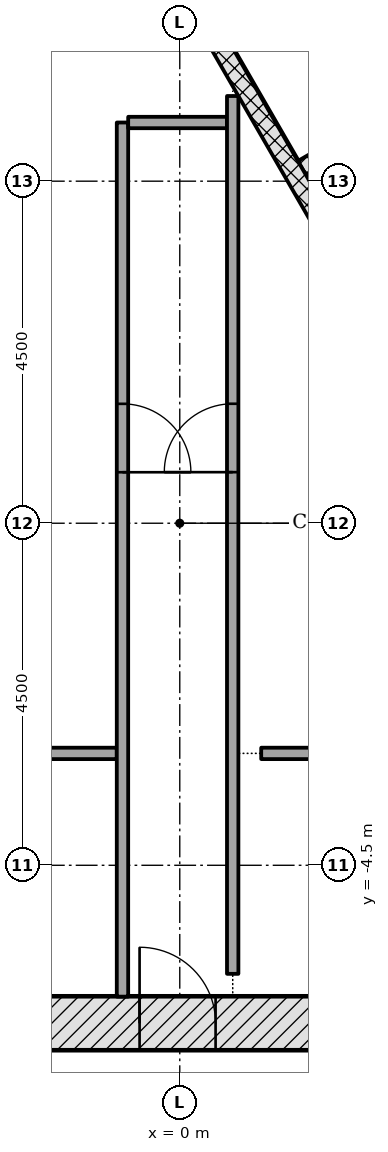
"""IFC4 building model, lengths in metres.
Left out: names, types, materials, properties, quantities, classifications, styles, units other than length and angle.
Written with IfcOpenShell. Run it as: python <this file> out.ifc"""

import sys

from ifc_helpers import new_model, si_unit, direction, frame, frame_2d, origin, place, context, subcontext, project, spatial, rectangle, extrude, element, fill, save


model = new_model("IFC4")
c1 = context("Model", 3, precision=1e-05, world=origin(), true_north=direction((0.0, 1.0)))
c2 = subcontext(c1, "Body", "Model", "MODEL_VIEW")
j1 = project(units=[si_unit("LENGTHUNIT", "METRE"), si_unit("PLANEANGLEUNIT", "RADIAN")], contexts=[c1])
p1 = place(None, origin())
s1 = spatial("IfcSite", under=j1, at=p1, CompositionType="ELEMENT")
p2 = place(p1, origin())
s2 = spatial("IfcBuilding", under=s1, at=p2, CompositionType="ELEMENT")
p3 = place(p2, frame((0.0, 0.0, 168.9)))
s3 = spatial("IfcBuildingStorey", under=s2, at=p3, CompositionType="ELEMENT", Elevation=168.9)
p4 = place(p3, frame((-9.229, -6.578, -0.3), z_axis=(0.0, 0.0, 1.0), x_axis=(1.0, 0.0, 0.0)))
e1 = element("IfcWall", 1, at=p4, inside=s3, PredefinedType="SHEAR", context=c2, shape_type="SweptSolid", body=[
    extrude(rectangle(XDim=18.458, YDim=0.7, at=frame_2d((9.229, 0.0))), origin(), (0.0, 0.0, 1.0), 5.5),
])
p5 = place(p4, frame((8.7, 0.0, 0.3)))
e2 = element("IfcOpeningElement", 2, at=p5, cuts=e1, PredefinedType="OPENING", context=c2, shape_type="SweptSolid", body=[
    extrude(rectangle(XDim=1.0, YDim=2.1, at=frame_2d((0.5, 1.05))), frame((0.0, 0.36, 0.0), z_axis=(0.0, -1.0, 0.0), x_axis=(1.0, 0.0, 0.0)), (0.0, 0.0, 1.0), 0.72),
])
p6 = place(p4, frame((3.99, 0.0, 0.3)))
e3 = element("IfcOpeningElement", 3, at=p6, cuts=e1, PredefinedType="OPENING", context=c2, shape_type="SweptSolid", body=[
    extrude(rectangle(XDim=0.9, YDim=2.1, at=frame_2d((0.45, 1.05))), frame((0.0, 0.36, 0.0), z_axis=(0.0, -1.0, 0.0), x_axis=(1.0, 0.0, 0.0)), (0.0, 0.0, 1.0), 0.72),
])
p7 = place(p4, frame((13.539, 0.0, 0.3)))
e4 = element("IfcOpeningElement", 4, at=p7, cuts=e1, PredefinedType="OPENING", context=c2, shape_type="SweptSolid", body=[
    extrude(rectangle(XDim=0.9, YDim=2.1, at=frame_2d((0.45, 1.05))), frame((0.0, 0.36, 0.0), z_axis=(0.0, -1.0, 0.0), x_axis=(1.0, 0.0, 0.0)), (0.0, 0.0, 1.0), 0.72),
])
p8 = place(p3, frame((10.311, -4.703, -0.3), z_axis=(0.0, 0.0, 1.0), x_axis=(-0.500001446645, 0.866024568562, 0.0)))
e5 = element("IfcWall", 5, at=p8, inside=s3, PredefinedType="SHEAR", context=c2, shape_type="SweptSolid", body=[
    extrude(rectangle(XDim=18.458, YDim=0.7, at=frame_2d((9.229, 0.0))), origin(), (0.0, 0.0, 1.0), 5.5),
])
p9 = place(p3, frame((-1.083, 11.281, -0.3), z_axis=(0.0, 0.0, 1.0), x_axis=(-0.500001446645, -0.866024568562, 0.0)))
e6 = element("IfcWall", 6, at=p9, inside=s3, PredefinedType="SHEAR", context=c2, shape_type="SweptSolid", body=[
    extrude(rectangle(XDim=18.458, YDim=0.7, at=frame_2d((9.229, 0.0))), origin(), (0.0, 0.0, 1.0), 5.5),
])
p10 = place(p9, frame((8.979, 0.0, 0.3)))
e7 = element("IfcOpeningElement", 7, at=p10, cuts=e6, PredefinedType="OPENING", context=c2, shape_type="SweptSolid", body=[
    extrude(rectangle(XDim=1.2, YDim=2.1, at=frame_2d((0.6, 1.05))), frame((0.0, 0.36, 0.0), z_axis=(0.0, -1.0, 0.0), x_axis=(1.0, 0.0, 0.0)), (0.0, 0.0, 1.0), 0.72),
])
p11 = place(p9, frame((11.029, 0.0, 0.3)))
e8 = element("IfcOpeningElement", 8, at=p11, cuts=e6, PredefinedType="OPENING", context=c2, shape_type="SweptSolid", body=[
    extrude(rectangle(XDim=1.2, YDim=2.1, at=frame_2d((0.6, 1.05))), frame((0.0, 0.36, 0.0), z_axis=(0.0, -1.0, 0.0), x_axis=(1.0, 0.0, 0.0)), (0.0, 0.0, 1.0), 0.72),
])
p12 = place(p3, frame((3.781, 5.907, -0.3), z_axis=(0.0, 0.0, 1.0), x_axis=(-0.866022959057, -0.500004234368, 0.0)))
e9 = element("IfcWall", 9, at=p12, inside=s3, PredefinedType="PARTITIONING", context=c2, shape_type="SweptSolid", body=[
    extrude(rectangle(XDim=2.5, YDim=0.25, at=frame_2d((1.25, 0.0))), origin(), (0.0, 0.0, 1.0), 5.5),
])
p13 = place(p3, frame((5.87, -2.961, 0.0), z_axis=(0.0, 0.0, 1.0), x_axis=(-0.50000615651, 0.866021849293, 0.0)))
e10 = element("IfcWall", 10, at=p13, inside=s3, PredefinedType="PARTITIONING", context=c2, shape_type="SweptSolid", body=[
    extrude(rectangle(XDim=11.0, YDim=0.25, at=frame_2d((5.5, 0.0))), origin(), (0.0, 0.0, 1.0), 5.2),
])
p14 = place(p3, frame((-5.258, -3.028, 0.0), z_axis=(0.0, 0.0, 1.0), x_axis=(1.0, 0.0, 0.0)))
e11 = element("IfcWall", 11, at=p14, inside=s3, PredefinedType="PARTITIONING", context=c2, shape_type="SweptSolid", body=[
    extrude(rectangle(XDim=4.429, YDim=0.15, at=frame_2d((2.215, 0.0))), origin(), (0.0, 0.0, 1.0), 5.2),
])
p15 = place(p3, frame((-0.754, 5.272, 0.0), z_axis=(0.0, 0.0, 1.0), x_axis=(0.0, -1.0, 0.0)))
e12 = element("IfcWall", 12, at=p15, inside=s3, PredefinedType="PARTITIONING", context=c2, shape_type="SweptSolid", body=[
    extrude(rectangle(XDim=11.5, YDim=0.15, at=frame_2d((5.75, 0.0))), origin(), (0.0, 0.0, 1.0), 5.2),
])
p16 = place(p15, frame((3.701, 0.0, 0.0)))
e13 = element("IfcOpeningElement", 13, at=p16, cuts=e12, PredefinedType="OPENING", context=c2, shape_type="SweptSolid", body=[
    extrude(rectangle(XDim=0.9, YDim=2.1, at=frame_2d((0.45, 1.05))), frame((0.0, 0.085, 0.0), z_axis=(0.0, -1.0, 0.0), x_axis=(1.0, 0.0, 0.0)), (0.0, 0.0, 1.0), 0.17),
])
p17 = place(p3, frame((-0.679, 5.272, 0.0), z_axis=(0.0, 0.0, 1.0), x_axis=(1.0, 0.0, 0.0)))
e14 = element("IfcWall", 14, at=p17, inside=s3, PredefinedType="PARTITIONING", context=c2, shape_type="SweptSolid", body=[
    extrude(rectangle(XDim=1.3, YDim=0.15, at=frame_2d((0.65, 0.0))), origin(), (0.0, 0.0, 1.0), 5.2),
])
p18 = place(p3, frame((0.696, -5.928, 0.0), z_axis=(0.0, 0.0, 1.0), x_axis=(0.0, 1.0, 0.0)))
e15 = element("IfcWall", 15, at=p18, inside=s3, PredefinedType="PARTITIONING", context=c2, shape_type="SweptSolid", body=[
    extrude(rectangle(XDim=11.549, YDim=0.15, at=frame_2d((5.774, 0.0))), origin(), (0.0, 0.0, 1.0), 5.2),
])
p19 = place(p18, frame((6.6, 0.0, 0.0)))
e16 = element("IfcOpeningElement", 16, at=p19, cuts=e15, PredefinedType="OPENING", context=c2, shape_type="SweptSolid", body=[
    extrude(rectangle(XDim=0.9, YDim=2.1, at=frame_2d((0.45, 1.05))), frame((0.0, 0.085, 0.0), z_axis=(0.0, -1.0, 0.0), x_axis=(1.0, 0.0, 0.0)), (0.0, 0.0, 1.0), 0.17),
])
p20 = place(p3, frame((1.071, -3.028, 0.0), z_axis=(0.0, 0.0, 1.0), x_axis=(1.0, 0.0, 0.0)))
e17 = element("IfcWall", 17, at=p20, inside=s3, PredefinedType="PARTITIONING", context=c2, shape_type="SweptSolid", body=[
    extrude(rectangle(XDim=7.569, YDim=0.15, at=frame_2d((3.784, 0.0))), origin(), (0.0, 0.0, 1.0), 5.2),
])
p21 = place(p3, frame((-0.687, 19.667, 0.0), z_axis=(0.0, 0.0, 1.0), x_axis=(-0.500000491645, -0.866025119933, 0.0)))
e18 = element("IfcWall", 18, at=p21, inside=s3, PredefinedType="PARTITIONING", context=c2, shape_type="SweptSolid", body=[
    extrude(rectangle(XDim=23.943, YDim=0.2, at=frame_2d((11.971, 0.0))), origin(), (0.0, 0.0, 1.0), 4.647),
])
p22 = place(p21, frame((16.287, 0.0, 0.0)))
e19 = element("IfcOpeningElement", 19, at=p22, cuts=e18, PredefinedType="OPENING", context=c2, shape_type="SweptSolid", body=[
    extrude(rectangle(XDim=1.2, YDim=2.1, at=frame_2d((0.6, 1.05))), frame((0.0, 0.11, 0.0), z_axis=(0.0, -1.0, 0.0), x_axis=(1.0, 0.0, 0.0)), (0.0, 0.0, 1.0), 0.22),
])
p23 = place(p3, frame((-16.104, -3.037, 0.0), z_axis=(0.0, 0.0, 1.0), x_axis=(0.500000282061, 0.866025240936, 0.0)))
e20 = element("IfcWall", 20, at=p23, inside=s3, PredefinedType="PARTITIONING", context=c2, shape_type="SweptSolid", body=[
    extrude(rectangle(XDim=29.235, YDim=0.2, at=frame_2d((14.617, 0.0))), origin(), (0.0, 0.0, 1.0), 4.647),
])
p24 = place(p23, frame((20.65, 0.0, 0.0)))
e21 = element("IfcOpeningElement", 21, at=p24, cuts=e20, PredefinedType="OPENING", context=c2, shape_type="SweptSolid", body=[
    extrude(rectangle(XDim=1.0, YDim=2.1, at=frame_2d((0.5, 1.05))), frame((0.0, 0.11, 0.0), z_axis=(0.0, -1.0, 0.0), x_axis=(1.0, 0.0, 0.0)), (0.0, 0.0, 1.0), 0.22),
])
p25 = place(p23, frame((10.287, 0.0, 0.0)))
e22 = element("IfcOpeningElement", 22, at=p25, cuts=e20, PredefinedType="OPENING", context=c2, shape_type="SweptSolid", body=[
    extrude(rectangle(XDim=1.0, YDim=2.1, at=frame_2d((0.5, 1.05))), frame((0.0, 0.11, 0.0), z_axis=(0.0, -1.0, 0.0), x_axis=(1.0, 0.0, 0.0)), (0.0, 0.0, 1.0), 0.22),
])
p26 = place(p23, frame((5.865, 0.0, 0.0)))
e23 = element("IfcOpeningElement", 23, at=p26, cuts=e20, PredefinedType="OPENING", context=c2, shape_type="SweptSolid", body=[
    extrude(rectangle(XDim=1.0, YDim=2.1, at=frame_2d((0.5, 1.05))), frame((0.0, 0.11, 0.0), z_axis=(0.0, -1.0, 0.0), x_axis=(1.0, 0.0, 0.0)), (0.0, 0.0, 1.0), 0.22),
])
p27 = place(p23, frame((1.859, 0.0, 0.0)))
e24 = element("IfcOpeningElement", 24, at=p27, cuts=e20, PredefinedType="OPENING", context=c2, shape_type="SweptSolid", body=[
    extrude(rectangle(XDim=1.0, YDim=2.1, at=frame_2d((0.5, 1.05))), frame((0.0, 0.11, 0.0), z_axis=(0.0, -1.0, 0.0), x_axis=(1.0, 0.0, 0.0)), (0.0, 0.0, 1.0), 0.22),
])
p28 = place(p5, origin())
e25 = element("IfcDoor", 25, at=p28, inside=s3, OperationType="SINGLE_SWING_LEFT", PredefinedType="DOOR", context=c2, shape_type="SweptSolid", body=[
    extrude(rectangle(XDim=1.0, YDim=2.1, at=frame_2d((0.5, 1.05))), frame((0.0, 0.075, 0.0), z_axis=(0.0, -1.0, 0.0), x_axis=(1.0, 0.0, 0.0)), (0.0, 0.0, 1.0), 0.15),
])
fill(e2, e25)
p29 = place(p16, origin())
e26 = element("IfcDoor", 26, at=p29, inside=s3, OperationType="SINGLE_SWING_RIGHT", PredefinedType="DOOR", context=c2, shape_type="SweptSolid", body=[
    extrude(rectangle(XDim=0.9, YDim=2.1, at=frame_2d((0.45, 1.05))), frame((0.0, 0.025, 0.0), z_axis=(0.0, -1.0, 0.0), x_axis=(1.0, 0.0, 0.0)), (0.0, 0.0, 1.0), 0.05),
])
fill(e13, e26)
p30 = place(p19, origin())
e27 = element("IfcDoor", 27, at=p30, inside=s3, OperationType="SINGLE_SWING_LEFT", PredefinedType="DOOR", context=c2, shape_type="SweptSolid", body=[
    extrude(rectangle(XDim=0.9, YDim=2.1, at=frame_2d((0.45, 1.05))), frame((0.0, 0.025, 0.0), z_axis=(0.0, -1.0, 0.0), x_axis=(1.0, 0.0, 0.0)), (0.0, 0.0, 1.0), 0.05),
])
fill(e16, e27)
save(model, sys.argv[1])
